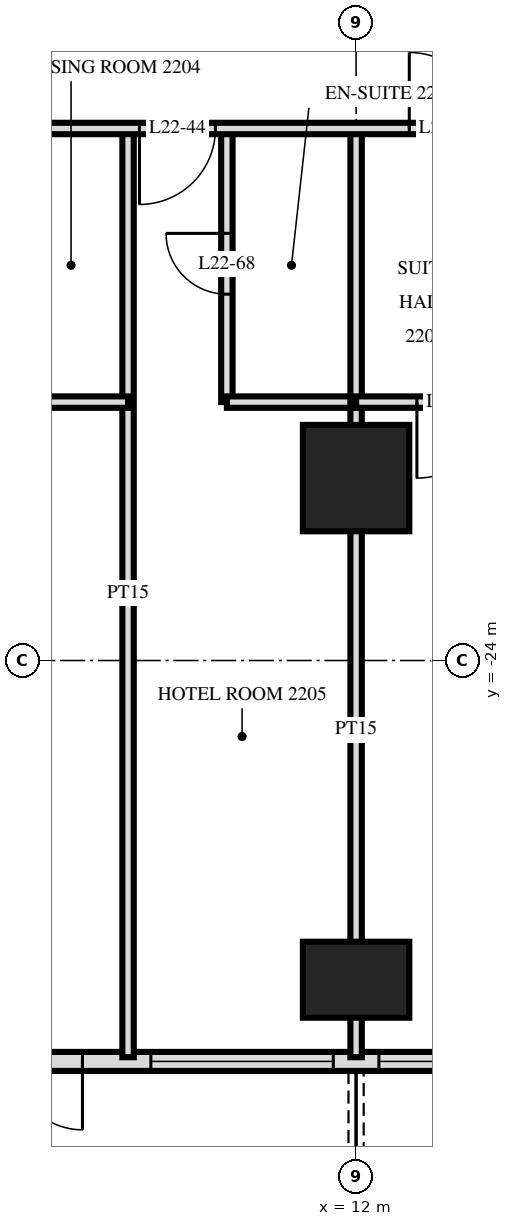
"""IFC4 building model, lengths in metres.
Left out: names, types, materials, properties, quantities, classifications, styles, units other than length and angle.
Written with IfcOpenShell. Run it as: python <this file> out.ifc"""

import sys

from ifc_helpers import new_model, si_unit, direction, frame, frame_2d, origin, origin_2d, place, context, subcontext, project, spatial, rectangle, extrude, element, fill, save


model = new_model("IFC4")
c1 = context("Model", 3, precision=1e-05, world=origin(), true_north=direction((0.0, 1.0)))
c2 = subcontext(c1, "Body", "Model", "MODEL_VIEW")
j1 = project(units=[si_unit("LENGTHUNIT", "METRE"), si_unit("PLANEANGLEUNIT", "RADIAN")], contexts=[c1])
p1 = place(None, origin())
s1 = spatial("IfcSite", under=j1, at=p1, CompositionType="ELEMENT")
p2 = place(p1, origin())
s2 = spatial("IfcBuilding", under=s1, at=p2, CompositionType="ELEMENT")
p3 = place(p2, frame((0.0, 0.0, 88.8)))
s3 = spatial("IfcBuildingStorey", under=s2, at=p3, CompositionType="ELEMENT", Elevation=88.8)
p4 = place(p3, frame((12.0, -28.2, 0.0), z_axis=(0.0, 0.0, 1.0), x_axis=(1.0, 0.0, 0.0)))
e1 = element("IfcColumn", 1, at=p4, inside=s3, PredefinedType="COLUMN", context=c2, shape_type="SweptSolid", body=[
    extrude(rectangle(XDim=1.4, YDim=1.0, at=origin_2d()), origin(), (0.0, 0.0, 1.0), 3.6),
])
p5 = place(p3, frame((12.0, -21.6, 0.0), z_axis=(0.0, 0.0, 1.0), x_axis=(1.0, 0.0, 0.0)))
e2 = element("IfcColumn", 2, at=p5, inside=s3, PredefinedType="COLUMN", context=c2, shape_type="SweptSolid", body=[
    extrude(rectangle(XDim=1.4, YDim=1.4, at=origin_2d()), origin(), (0.0, 0.0, 1.0), 3.6),
])
p6 = place(p3, frame((-28.775, -29.275, 0.0), z_axis=(0.0, 0.0, 1.0), x_axis=(1.0, 0.0, 0.0)))
e3 = element("IfcWall", 3, at=p6, inside=s3, PredefinedType="SOLIDWALL", context=c2, shape_type="SweptSolid", body=[
    extrude(rectangle(XDim=57.551, YDim=0.25, at=frame_2d((28.775, 0.0))), origin(), (0.0, 0.0, 1.0), 3.32),
])
p7 = place(p6, frame((0.575, 0.0, 0.0)))
e4 = element("IfcOpeningElement", 4, at=p7, cuts=e3, PredefinedType="OPENING", context=c2, shape_type="SweptSolid", body=[
    extrude(rectangle(XDim=1.8, YDim=2.4, at=frame_2d((0.9, 1.2))), frame((0.0, 0.135, 0.0), z_axis=(0.0, -1.0, 0.0), x_axis=(1.0, 0.0, 0.0)), (0.0, 0.0, 1.0), 0.27),
])
p8 = place(p6, frame((5.075, 0.0, 0.3)))
e5 = element("IfcOpeningElement", 5, at=p8, cuts=e3, PredefinedType="OPENING", context=c2, shape_type="SweptSolid", body=[
    extrude(rectangle(XDim=2.4, YDim=2.1, at=frame_2d((1.2, 1.05))), frame((0.0, 0.135, 0.0), z_axis=(0.0, -1.0, 0.0), x_axis=(1.0, 0.0, 0.0)), (0.0, 0.0, 1.0), 0.27),
])
p9 = place(p6, frame((8.375, 0.0, 0.0)))
e6 = element("IfcOpeningElement", 6, at=p9, cuts=e3, PredefinedType="OPENING", context=c2, shape_type="SweptSolid", body=[
    extrude(rectangle(XDim=1.8, YDim=2.4, at=frame_2d((0.9, 1.2))), frame((0.0, 0.135, 0.0), z_axis=(0.0, -1.0, 0.0), x_axis=(1.0, 0.0, 0.0)), (0.0, 0.0, 1.0), 0.27),
])
p10 = place(p6, frame((11.375, 0.0, 0.0)))
e7 = element("IfcOpeningElement", 7, at=p10, cuts=e3, PredefinedType="OPENING", context=c2, shape_type="SweptSolid", body=[
    extrude(rectangle(XDim=1.8, YDim=2.4, at=frame_2d((0.9, 1.2))), frame((0.0, 0.135, 0.0), z_axis=(0.0, -1.0, 0.0), x_axis=(1.0, 0.0, 0.0)), (0.0, 0.0, 1.0), 0.27),
])
p11 = place(p6, frame((14.075, 0.0, 0.3)))
e8 = element("IfcOpeningElement", 8, at=p11, cuts=e3, PredefinedType="OPENING", context=c2, shape_type="SweptSolid", body=[
    extrude(rectangle(XDim=2.4, YDim=2.1, at=frame_2d((1.2, 1.05))), frame((0.0, 0.135, 0.0), z_axis=(0.0, -1.0, 0.0), x_axis=(1.0, 0.0, 0.0)), (0.0, 0.0, 1.0), 0.27),
])
p12 = place(p6, frame((17.375, 0.0, 0.0)))
e9 = element("IfcOpeningElement", 9, at=p12, cuts=e3, PredefinedType="OPENING", context=c2, shape_type="SweptSolid", body=[
    extrude(rectangle(XDim=1.8, YDim=2.4, at=frame_2d((0.9, 1.2))), frame((0.0, 0.135, 0.0), z_axis=(0.0, -1.0, 0.0), x_axis=(1.0, 0.0, 0.0)), (0.0, 0.0, 1.0), 0.27),
])
p13 = place(p6, frame((20.075, 0.0, 0.3)))
e10 = element("IfcOpeningElement", 10, at=p13, cuts=e3, PredefinedType="OPENING", context=c2, shape_type="SweptSolid", body=[
    extrude(rectangle(XDim=2.4, YDim=2.1, at=frame_2d((1.2, 1.05))), frame((0.0, 0.135, 0.0), z_axis=(0.0, -1.0, 0.0), x_axis=(1.0, 0.0, 0.0)), (0.0, 0.0, 1.0), 0.27),
])
p14 = place(p6, frame((23.075, 0.0, 0.3)))
e11 = element("IfcOpeningElement", 11, at=p14, cuts=e3, PredefinedType="OPENING", context=c2, shape_type="SweptSolid", body=[
    extrude(rectangle(XDim=2.4, YDim=2.1, at=frame_2d((1.2, 1.05))), frame((0.0, 0.135, 0.0), z_axis=(0.0, -1.0, 0.0), x_axis=(1.0, 0.0, 0.0)), (0.0, 0.0, 1.0), 0.27),
])
p15 = place(p6, frame((26.375, 0.0, 0.0)))
e12 = element("IfcOpeningElement", 12, at=p15, cuts=e3, PredefinedType="OPENING", context=c2, shape_type="SweptSolid", body=[
    extrude(rectangle(XDim=1.8, YDim=2.4, at=frame_2d((0.9, 1.2))), frame((0.0, 0.135, 0.0), z_axis=(0.0, -1.0, 0.0), x_axis=(1.0, 0.0, 0.0)), (0.0, 0.0, 1.0), 0.27),
])
p16 = place(p6, frame((29.375, 0.0, 0.0)))
e13 = element("IfcOpeningElement", 13, at=p16, cuts=e3, PredefinedType="OPENING", context=c2, shape_type="SweptSolid", body=[
    extrude(rectangle(XDim=1.8, YDim=2.4, at=frame_2d((0.9, 1.2))), frame((0.0, 0.135, 0.0), z_axis=(0.0, -1.0, 0.0), x_axis=(1.0, 0.0, 0.0)), (0.0, 0.0, 1.0), 0.27),
])
p17 = place(p6, frame((32.075, 0.0, 0.3)))
e14 = element("IfcOpeningElement", 14, at=p17, cuts=e3, PredefinedType="OPENING", context=c2, shape_type="SweptSolid", body=[
    extrude(rectangle(XDim=2.4, YDim=2.1, at=frame_2d((1.2, 1.05))), frame((0.0, 0.135, 0.0), z_axis=(0.0, -1.0, 0.0), x_axis=(1.0, 0.0, 0.0)), (0.0, 0.0, 1.0), 0.27),
])
p18 = place(p6, frame((35.375, 0.0, 0.0)))
e15 = element("IfcOpeningElement", 15, at=p18, cuts=e3, PredefinedType="OPENING", context=c2, shape_type="SweptSolid", body=[
    extrude(rectangle(XDim=1.8, YDim=2.4, at=frame_2d((0.9, 1.2))), frame((0.0, 0.135, 0.0), z_axis=(0.0, -1.0, 0.0), x_axis=(1.0, 0.0, 0.0)), (0.0, 0.0, 1.0), 0.27),
])
p19 = place(p6, frame((38.075, 0.0, 0.3)))
e16 = element("IfcOpeningElement", 16, at=p19, cuts=e3, PredefinedType="OPENING", context=c2, shape_type="SweptSolid", body=[
    extrude(rectangle(XDim=2.4, YDim=2.1, at=frame_2d((1.2, 1.05))), frame((0.0, 0.135, 0.0), z_axis=(0.0, -1.0, 0.0), x_axis=(1.0, 0.0, 0.0)), (0.0, 0.0, 1.0), 0.27),
])
p20 = place(p6, frame((41.075, 0.0, 0.3)))
e17 = element("IfcOpeningElement", 17, at=p20, cuts=e3, PredefinedType="OPENING", context=c2, shape_type="SweptSolid", body=[
    extrude(rectangle(XDim=2.4, YDim=2.1, at=frame_2d((1.2, 1.05))), frame((0.0, 0.135, 0.0), z_axis=(0.0, -1.0, 0.0), x_axis=(1.0, 0.0, 0.0)), (0.0, 0.0, 1.0), 0.27),
])
p21 = place(p6, frame((44.375, 0.0, 0.0)))
e18 = element("IfcOpeningElement", 18, at=p21, cuts=e3, PredefinedType="OPENING", context=c2, shape_type="SweptSolid", body=[
    extrude(rectangle(XDim=1.8, YDim=2.4, at=frame_2d((0.9, 1.2))), frame((0.0, 0.135, 0.0), z_axis=(0.0, -1.0, 0.0), x_axis=(1.0, 0.0, 0.0)), (0.0, 0.0, 1.0), 0.27),
])
p22 = place(p6, frame((47.075, 0.0, 0.3)))
e19 = element("IfcOpeningElement", 19, at=p22, cuts=e3, PredefinedType="OPENING", context=c2, shape_type="SweptSolid", body=[
    extrude(rectangle(XDim=2.4, YDim=2.1, at=frame_2d((1.2, 1.05))), frame((0.0, 0.135, 0.0), z_axis=(0.0, -1.0, 0.0), x_axis=(1.0, 0.0, 0.0)), (0.0, 0.0, 1.0), 0.27),
])
p23 = place(p6, frame((50.375, 0.0, 0.0)))
e20 = element("IfcOpeningElement", 20, at=p23, cuts=e3, PredefinedType="OPENING", context=c2, shape_type="SweptSolid", body=[
    extrude(rectangle(XDim=1.8, YDim=2.4, at=frame_2d((0.9, 1.2))), frame((0.0, 0.135, 0.0), z_axis=(0.0, -1.0, 0.0), x_axis=(1.0, 0.0, 0.0)), (0.0, 0.0, 1.0), 0.27),
])
p24 = place(p6, frame((53.375, 0.0, 0.0)))
e21 = element("IfcOpeningElement", 21, at=p24, cuts=e3, PredefinedType="OPENING", context=c2, shape_type="SweptSolid", body=[
    extrude(rectangle(XDim=1.8, YDim=2.4, at=frame_2d((0.9, 1.2))), frame((0.0, 0.135, 0.0), z_axis=(0.0, -1.0, 0.0), x_axis=(1.0, 0.0, 0.0)), (0.0, 0.0, 1.0), 0.27),
])
p25 = place(p3, frame((12.0, -20.6, 0.0), z_axis=(0.0, 0.0, 1.0), x_axis=(0.0, 1.0, 0.0)))
e22 = element("IfcWall", 22, at=p25, inside=s3, PredefinedType="PARTITIONING", context=c2, shape_type="SweptSolid", body=[
    extrude(rectangle(XDim=3.6, YDim=0.15, at=frame_2d((1.8, 0.0))), origin(), (0.0, 0.0, 1.0), 3.32),
])
p26 = place(p3, frame((12.0, -29.22, 0.0), z_axis=(0.0, 0.0, 1.0), x_axis=(0.0, 1.0, 0.0)))
e23 = element("IfcWall", 23, at=p26, inside=s3, PredefinedType="PARTITIONING", context=c2, shape_type="SweptSolid", body=[
    extrude(rectangle(XDim=8.62, YDim=0.15, at=frame_2d((4.31, 0.0))), origin(), (0.0, 0.0, 1.0), 3.32),
])
p27 = place(p3, frame((10.3, -20.6, 0.0), z_axis=(0.0, 0.0, 1.0), x_axis=(0.0, 1.0, 0.0)))
e24 = element("IfcWall", 24, at=p27, inside=s3, PredefinedType="PARTITIONING", context=c2, shape_type="SweptSolid", body=[
    extrude(rectangle(XDim=3.6, YDim=0.15, at=frame_2d((1.8, 0.0))), origin(), (0.0, 0.0, 1.0), 3.32),
])
p28 = place(p27, frame((1.42, 0.0, 0.0)))
e25 = element("IfcOpeningElement", 25, at=p28, cuts=e24, PredefinedType="OPENING", context=c2, shape_type="SweptSolid", body=[
    extrude(rectangle(XDim=0.8, YDim=2.1, at=frame_2d((0.4, 1.05))), frame((0.0, 0.085, 0.0), z_axis=(0.0, -1.0, 0.0), x_axis=(1.0, 0.0, 0.0)), (0.0, 0.0, 1.0), 0.17),
])
p29 = place(p3, frame((9.0, -29.22, 0.0), z_axis=(0.0, 0.0, 1.0), x_axis=(0.0, 1.0, 0.0)))
e26 = element("IfcWall", 26, at=p29, inside=s3, PredefinedType="PARTITIONING", context=c2, shape_type="SweptSolid", body=[
    extrude(rectangle(XDim=12.22, YDim=0.15, at=frame_2d((6.11, 0.0))), origin(), (0.0, 0.0, 1.0), 3.32),
])
p30 = place(p3, frame((12.0, -20.6, 0.0), z_axis=(0.0, 0.0, 1.0), x_axis=(1.0, 0.0, 0.0)))
e27 = element("IfcWall", 27, at=p30, inside=s3, PredefinedType="PARTITIONING", context=c2, shape_type="SweptSolid", body=[
    extrude(rectangle(XDim=2.4, YDim=0.15, at=frame_2d((1.2, 0.0))), origin(), (0.0, 0.0, 1.0), 3.32),
])
p31 = place(p30, frame((0.8, 0.0, 0.0)))
e28 = element("IfcOpeningElement", 28, at=p31, cuts=e27, PredefinedType="OPENING", context=c2, shape_type="SweptSolid", body=[
    extrude(rectangle(XDim=1.0, YDim=2.1, at=frame_2d((0.5, 1.05))), frame((0.0, 0.085, 0.0), z_axis=(0.0, -1.0, 0.0), x_axis=(1.0, 0.0, 0.0)), (0.0, 0.0, 1.0), 0.17),
])
p32 = place(p3, frame((7.5, -20.6, 0.0), z_axis=(0.0, 0.0, 1.0), x_axis=(1.0, 0.0, 0.0)))
e29 = element("IfcWall", 29, at=p32, inside=s3, PredefinedType="PARTITIONING", context=c2, shape_type="SweptSolid", body=[
    extrude(rectangle(XDim=1.5, YDim=0.15, at=frame_2d((0.75, 0.0))), origin(), (0.0, 0.0, 1.0), 3.32),
])
p33 = place(p3, frame((10.3, -20.6, 0.0), z_axis=(0.0, 0.0, 1.0), x_axis=(1.0, 0.0, 0.0)))
e30 = element("IfcWall", 30, at=p33, inside=s3, PredefinedType="PARTITIONING", context=c2, shape_type="SweptSolid", body=[
    extrude(rectangle(XDim=1.7, YDim=0.15, at=frame_2d((0.85, 0.0))), origin(), (0.0, 0.0, 1.0), 3.32),
])
p34 = place(p3, frame((-33.12, -17.0, 0.0), z_axis=(0.0, 0.0, 1.0), x_axis=(1.0, 0.0, 0.0)))
e31 = element("IfcWall", 31, at=p34, inside=s3, PredefinedType="PARTITIONING", context=c2, shape_type="SweptSolid", body=[
    extrude(rectangle(XDim=66.24, YDim=0.15, at=frame_2d((33.12, 0.0))), origin(), (0.0, 0.0, 1.0), 3.32),
])
p35 = place(p34, frame((16.27, 0.0, 0.0)))
e32 = element("IfcOpeningElement", 32, at=p35, cuts=e31, PredefinedType="OPENING", context=c2, shape_type="SweptSolid", body=[
    extrude(rectangle(XDim=1.0, YDim=2.1, at=frame_2d((0.5, 1.05))), frame((0.0, 0.085, 0.0), z_axis=(0.0, -1.0, 0.0), x_axis=(1.0, 0.0, 0.0)), (0.0, 0.0, 1.0), 0.17),
])
p36 = place(p34, frame((22.97, 0.0, 0.0)))
e33 = element("IfcOpeningElement", 33, at=p36, cuts=e31, PredefinedType="OPENING", context=c2, shape_type="SweptSolid", body=[
    extrude(rectangle(XDim=1.0, YDim=2.1, at=frame_2d((0.5, 1.05))), frame((0.0, 0.085, 0.0), z_axis=(0.0, -1.0, 0.0), x_axis=(1.0, 0.0, 0.0)), (0.0, 0.0, 1.0), 0.17),
])
p37 = place(p34, frame((34.42, 0.0, 0.0)))
e34 = element("IfcOpeningElement", 34, at=p37, cuts=e31, PredefinedType="OPENING", context=c2, shape_type="SweptSolid", body=[
    extrude(rectangle(XDim=1.0, YDim=2.1, at=frame_2d((0.5, 1.05))), frame((0.0, 0.085, 0.0), z_axis=(0.0, -1.0, 0.0), x_axis=(1.0, 0.0, 0.0)), (0.0, 0.0, 1.0), 0.17),
])
p38 = place(p34, frame((39.22, 0.0, 0.0)))
e35 = element("IfcOpeningElement", 35, at=p38, cuts=e31, PredefinedType="OPENING", context=c2, shape_type="SweptSolid", body=[
    extrude(rectangle(XDim=1.0, YDim=2.1, at=frame_2d((0.5, 1.05))), frame((0.0, 0.085, 0.0), z_axis=(0.0, -1.0, 0.0), x_axis=(1.0, 0.0, 0.0)), (0.0, 0.0, 1.0), 0.17),
])
p39 = place(p34, frame((42.27, 0.0, 0.0)))
e36 = element("IfcOpeningElement", 36, at=p39, cuts=e31, PredefinedType="OPENING", context=c2, shape_type="SweptSolid", body=[
    extrude(rectangle(XDim=1.0, YDim=2.1, at=frame_2d((0.5, 1.05))), frame((0.0, 0.085, 0.0), z_axis=(0.0, -1.0, 0.0), x_axis=(1.0, 0.0, 0.0)), (0.0, 0.0, 1.0), 0.17),
])
p40 = place(p34, frame((45.82, 0.0, 0.0)))
e37 = element("IfcOpeningElement", 37, at=p40, cuts=e31, PredefinedType="OPENING", context=c2, shape_type="SweptSolid", body=[
    extrude(rectangle(XDim=1.0, YDim=2.1, at=frame_2d((0.5, 1.05))), frame((0.0, 0.085, 0.0), z_axis=(0.0, -1.0, 0.0), x_axis=(1.0, 0.0, 0.0)), (0.0, 0.0, 1.0), 0.17),
])
p41 = place(p34, frame((13.42, 0.0, 0.0)))
e38 = element("IfcOpeningElement", 38, at=p41, cuts=e31, PredefinedType="OPENING", context=c2, shape_type="SweptSolid", body=[
    extrude(rectangle(XDim=1.0, YDim=2.1, at=frame_2d((0.5, 1.05))), frame((0.0, 0.085, 0.0), z_axis=(0.0, -1.0, 0.0), x_axis=(1.0, 0.0, 0.0)), (0.0, 0.0, 1.0), 0.17),
])
p42 = place(p34, frame((54.82, 0.0, 0.0)))
e39 = element("IfcOpeningElement", 39, at=p42, cuts=e31, PredefinedType="OPENING", context=c2, shape_type="SweptSolid", body=[
    extrude(rectangle(XDim=1.0, YDim=2.1, at=frame_2d((0.5, 1.05))), frame((0.0, 0.085, 0.0), z_axis=(0.0, -1.0, 0.0), x_axis=(1.0, 0.0, 0.0)), (0.0, 0.0, 1.0), 0.17),
])
p43 = place(p18, frame((0.9, 0.0, 0.0), z_axis=(0.0, 0.0, 1.0), x_axis=(-1.0, 0.0, 0.0)))
e40 = element("IfcDoor", 40, at=p43, inside=s3, OperationType="DOUBLE_DOOR_SINGLE_SWING", PredefinedType="DOOR", context=c2, shape_type="SweptSolid", body=[
    extrude(rectangle(XDim=1.8, YDim=2.4, at=frame_2d((0.0, 1.2))), frame((0.0, -0.025, 0.0), z_axis=(0.0, 1.0, 0.0), x_axis=(-1.0, 0.0, 0.0)), (0.0, 0.0, 1.0), 0.05),
])
fill(e15, e40)
p44 = place(p19, origin())
e41 = element("IfcWindow", 41, at=p44, inside=s3, PartitioningType="SINGLE_PANEL", PredefinedType="WINDOW", context=c2, shape_type="SweptSolid", body=[
    extrude(rectangle(XDim=2.4, YDim=2.1, at=frame_2d((1.2, 1.05))), frame((0.0, 0.03, 0.0), z_axis=(0.0, -1.0, 0.0), x_axis=(1.0, 0.0, 0.0)), (0.0, 0.0, 1.0), 0.06),
])
fill(e16, e41)
p45 = place(p20, origin())
e42 = element("IfcWindow", 42, at=p45, inside=s3, PartitioningType="SINGLE_PANEL", PredefinedType="WINDOW", context=c2, shape_type="SweptSolid", body=[
    extrude(rectangle(XDim=2.4, YDim=2.1, at=frame_2d((1.2, 1.05))), frame((0.0, 0.03, 0.0), z_axis=(0.0, -1.0, 0.0), x_axis=(1.0, 0.0, 0.0)), (0.0, 0.0, 1.0), 0.06),
])
fill(e17, e42)
p46 = place(p39, frame((0.5, 0.0, 0.0), z_axis=(0.0, 0.0, 1.0), x_axis=(-1.0, 0.0, 0.0)))
e43 = element("IfcDoor", 43, at=p46, inside=s3, OperationType="SINGLE_SWING_LEFT", PredefinedType="DOOR", context=c2, shape_type="SweptSolid", body=[
    extrude(rectangle(XDim=1.0, YDim=2.1, at=frame_2d((0.0, 1.05))), frame((0.0, -0.025, 0.0), z_axis=(0.0, 1.0, 0.0), x_axis=(-1.0, 0.0, 0.0)), (0.0, 0.0, 1.0), 0.05),
])
fill(e36, e43)
p47 = place(p40, origin())
e44 = element("IfcDoor", 44, at=p47, inside=s3, OperationType="SINGLE_SWING_RIGHT", PredefinedType="DOOR", context=c2, shape_type="SweptSolid", body=[
    extrude(rectangle(XDim=1.0, YDim=2.1, at=frame_2d((0.5, 1.05))), frame((0.0, 0.025, 0.0), z_axis=(0.0, -1.0, 0.0), x_axis=(1.0, 0.0, 0.0)), (0.0, 0.0, 1.0), 0.05),
])
fill(e37, e44)
p48 = place(p28, origin())
e45 = element("IfcDoor", 45, at=p48, inside=s3, OperationType="SINGLE_SWING_LEFT", PredefinedType="DOOR", context=c2, shape_type="SweptSolid", body=[
    extrude(rectangle(XDim=0.8, YDim=2.1, at=frame_2d((0.4, 1.05))), frame((0.0, 0.025, 0.0), z_axis=(0.0, -1.0, 0.0), x_axis=(1.0, 0.0, 0.0)), (0.0, 0.0, 1.0), 0.05),
])
fill(e25, e45)
p49 = place(p31, frame((0.5, 0.0, 0.0), z_axis=(0.0, 0.0, 1.0), x_axis=(-1.0, 0.0, 0.0)))
e46 = element("IfcDoor", 46, at=p49, inside=s3, OperationType="SINGLE_SWING_LEFT", PredefinedType="DOOR", context=c2, shape_type="SweptSolid", body=[
    extrude(rectangle(XDim=1.0, YDim=2.1, at=frame_2d((0.0, 1.05))), frame((0.0, -0.025, 0.0), z_axis=(0.0, 1.0, 0.0), x_axis=(-1.0, 0.0, 0.0)), (0.0, 0.0, 1.0), 0.05),
])
fill(e28, e46)
save(model, sys.argv[1])
